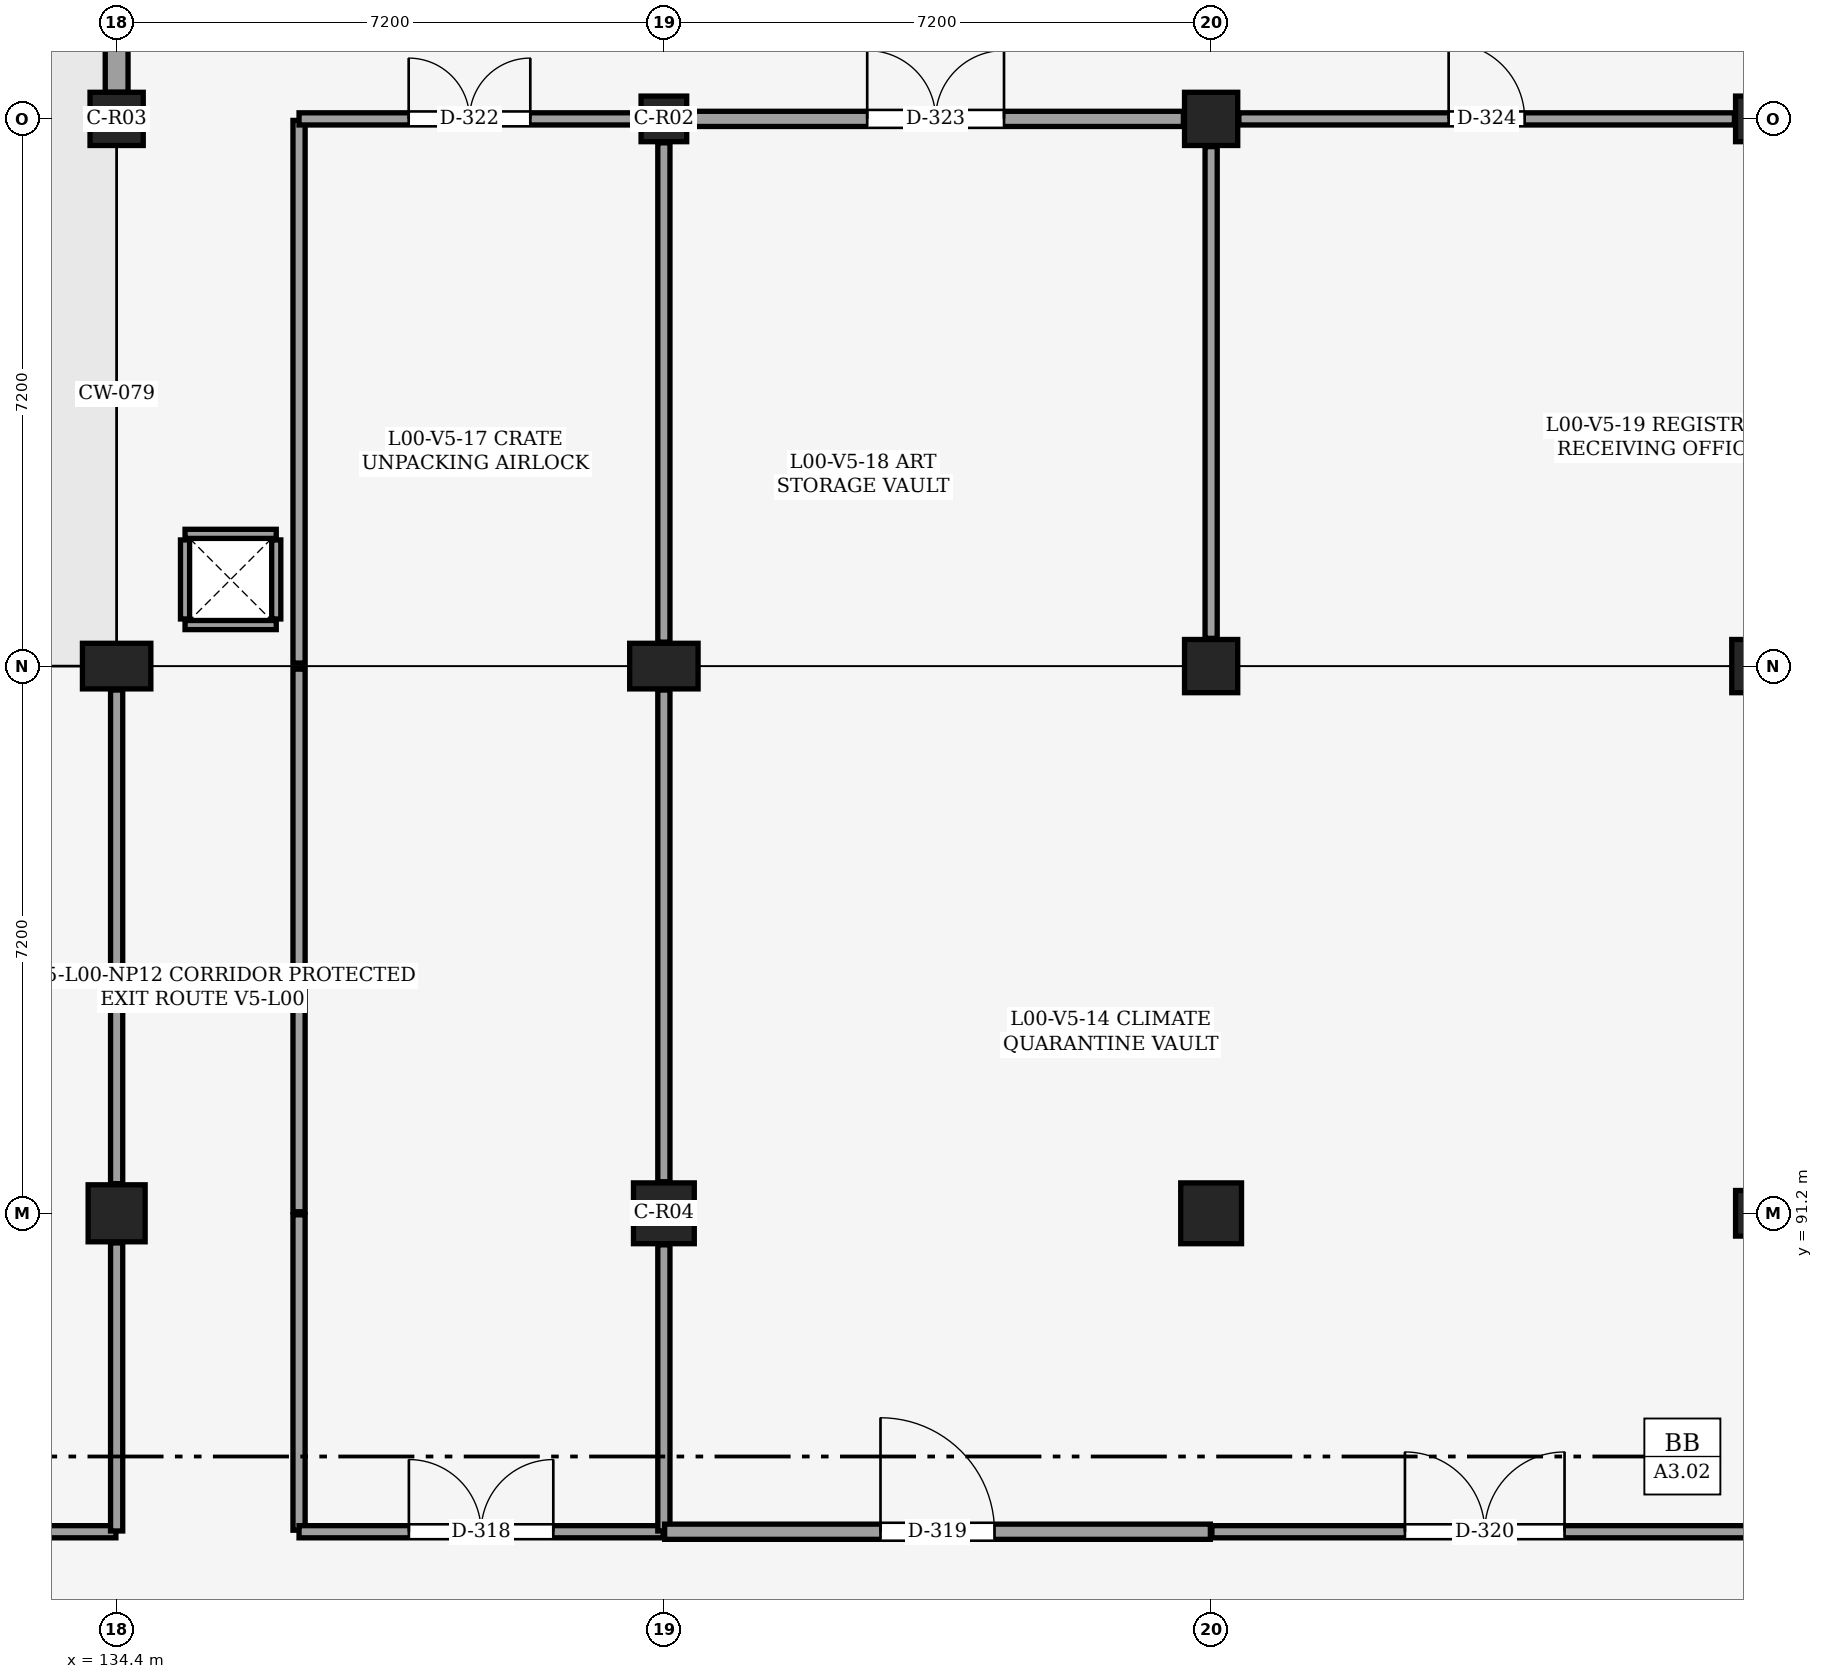
"""IFC4 building model, lengths in metres.
Left out: names, types, materials, properties, quantities, classifications, styles, units other than length and angle.
Written with IfcOpenShell. Run it as: python <this file> out.ifc"""

import sys

from ifc_helpers import new_model, si_unit, direction, frame, frame_2d, origin, origin_2d, place, context, subcontext, project, spatial, rectangle, circle, extrude, element, fill, save


model = new_model("IFC4")
c1 = context("Model", 3, precision=1e-05, world=origin(), true_north=direction((0.0, 1.0)))
c2 = subcontext(c1, "Body", "Model", "MODEL_VIEW")
j1 = project(units=[si_unit("LENGTHUNIT", "METRE"), si_unit("PLANEANGLEUNIT", "RADIAN")], contexts=[c1])
p1 = place(None, origin())
s1 = spatial("IfcSite", under=j1, at=p1, CompositionType="ELEMENT")
p2 = place(p1, origin())
s2 = spatial("IfcBuilding", under=s1, at=p2, CompositionType="ELEMENT")
p3 = place(p2, origin())
s3 = spatial("IfcBuildingStorey", under=s2, at=p3, CompositionType="ELEMENT", Elevation=0.0)
p4 = place(p3, frame((134.4, 91.2, 0.0), z_axis=(0.0, 0.0, 1.0), x_axis=(1.0, 0.0, 0.0)))
e1 = element("IfcColumn", 1, at=p4, inside=s3, PredefinedType="COLUMN", context=c2, shape_type="SweptSolid", body=[
    extrude(circle(Radius=0.375, at=origin_2d()), origin(), (0.0, 0.0, 1.0), 5.4),
])
p5 = place(p3, frame((134.4, 98.4, 0.0), z_axis=(0.0, 0.0, 1.0), x_axis=(1.0, 0.0, 0.0)))
e2 = element("IfcColumn", 2, at=p5, inside=s3, PredefinedType="COLUMN", context=c2, shape_type="SweptSolid", body=[
    extrude(rectangle(XDim=0.9, YDim=0.6, at=origin_2d()), origin(), (0.0, 0.0, 1.0), 5.4),
])
p6 = place(p3, frame((134.4, 105.6, 0.0), z_axis=(0.0, 0.0, 1.0), x_axis=(1.0, 0.0, 0.0)))
e3 = element("IfcColumn", 3, at=p6, inside=s3, PredefinedType="COLUMN", context=c2, shape_type="SweptSolid", body=[
    extrude(rectangle(XDim=0.7, YDim=0.7, at=origin_2d()), origin(), (0.0, 0.0, 1.0), 5.4),
])
p7 = place(p3, frame((141.6, 91.2, 0.0), z_axis=(0.0, 0.0, 1.0), x_axis=(1.0, 0.0, 0.0)))
e4 = element("IfcColumn", 4, at=p7, inside=s3, PredefinedType="COLUMN", context=c2, shape_type="SweptSolid", body=[
    extrude(rectangle(XDim=0.8, YDim=0.8, at=origin_2d()), origin(), (0.0, 0.0, 1.0), 5.4),
])
p8 = place(p3, frame((141.6, 98.4, 0.0), z_axis=(0.0, 0.0, 1.0), x_axis=(1.0, 0.0, 0.0)))
e5 = element("IfcColumn", 5, at=p8, inside=s3, PredefinedType="COLUMN", context=c2, shape_type="SweptSolid", body=[
    extrude(rectangle(XDim=0.9, YDim=0.6, at=origin_2d()), origin(), (0.0, 0.0, 1.0), 5.4),
])
p9 = place(p3, frame((141.6, 105.6, 0.0), z_axis=(0.0, 0.0, 1.0), x_axis=(1.0, 0.0, 0.0)))
e6 = element("IfcColumn", 6, at=p9, inside=s3, PredefinedType="COLUMN", context=c2, shape_type="SweptSolid", body=[
    extrude(rectangle(XDim=0.6, YDim=0.6, at=origin_2d()), origin(), (0.0, 0.0, 1.0), 5.4),
])
p10 = place(p3, frame((148.8, 91.2, 0.0), z_axis=(0.0, 0.0, 1.0), x_axis=(1.0, 0.0, 0.0)))
e7 = element("IfcColumn", 7, at=p10, inside=s3, PredefinedType="COLUMN", context=c2, shape_type="SweptSolid", body=[
    extrude(rectangle(XDim=0.8, YDim=0.8, at=origin_2d()), origin(), (0.0, 0.0, 1.0), 5.4),
])
for number, where, z_axis, x_axis in (
    (8, (148.8, 98.4, 0.0), (0.0, 0.0, 1.0), (1.0, 0.0, 0.0)),
    (9, (148.8, 105.6, 0.0), (0.0, 0.0, 1.0), (1.0, 0.0, 0.0)),
):
    element("IfcColumn", number, at=place(p3, frame(where, z_axis=z_axis, x_axis=x_axis)), inside=s3, PredefinedType="COLUMN", context=c2, shape_type="SweptSolid", body=[
        extrude(rectangle(XDim=0.7, YDim=0.7, at=origin_2d()), origin(), (0.0, 0.0, 1.0), 5.4),
    ])
p11 = place(p3, frame((156.0, 91.2, 0.0), z_axis=(0.0, 0.0, 1.0), x_axis=(1.0, 0.0, 0.0)))
e10 = element("IfcColumn", 10, at=p11, inside=s3, PredefinedType="COLUMN", context=c2, shape_type="SweptSolid", body=[
    extrude(rectangle(XDim=0.6, YDim=0.6, at=origin_2d()), origin(), (0.0, 0.0, 1.0), 5.4),
])
p12 = place(p3, frame((156.0, 98.4, 0.0), z_axis=(0.0, 0.0, 1.0), x_axis=(1.0, 0.0, 0.0)))
e11 = element("IfcColumn", 11, at=p12, inside=s3, PredefinedType="COLUMN", context=c2, shape_type="SweptSolid", body=[
    extrude(rectangle(XDim=0.7, YDim=0.7, at=origin_2d()), origin(), (0.0, 0.0, 1.0), 5.4),
])
p13 = place(p3, frame((156.0, 105.6, 0.0), z_axis=(0.0, 0.0, 1.0), x_axis=(1.0, 0.0, 0.0)))
e12 = element("IfcColumn", 12, at=p13, inside=s3, PredefinedType="COLUMN", context=c2, shape_type="SweptSolid", body=[
    extrude(rectangle(XDim=0.6, YDim=0.6, at=origin_2d()), origin(), (0.0, 0.0, 1.0), 5.4),
])
p14 = place(p3, frame((134.4, 105.95, 0.0), z_axis=(0.0, 0.0, 1.0), x_axis=(0.0, 1.0, 0.0)))
e13 = element("IfcWall", 13, at=p14, inside=s3, PredefinedType="SOLIDWALL", context=c2, shape_type="SweptSolid", body=[
    extrude(rectangle(XDim=6.55, YDim=0.3, at=frame_2d((3.275, 0.0))), origin(), (0.0, 0.0, 1.0), 4.54),
])
p15 = place(p14, frame((0.75, 0.0, 0.9)))
e14 = element("IfcOpeningElement", 14, at=p15, cuts=e13, PredefinedType="OPENING", context=c2, shape_type="SweptSolid", body=[
    extrude(rectangle(XDim=1.2, YDim=1.5, at=frame_2d((0.6, 0.75))), frame((0.0, 0.16, 0.0), z_axis=(0.0, -1.0, 0.0), x_axis=(1.0, 0.0, 0.0)), (0.0, 0.0, 1.0), 0.321),
])
for number, where, z_axis, x_axis in (
    (15, (135.3, 98.94, 0.0), (0.0, 0.0, 1.0), (1.0, 0.0, 0.0)),
    (16, (135.3, 100.14, 0.0), (0.0, 0.0, 1.0), (1.0, 0.0, 0.0)),
):
    element("IfcWall", number, at=place(p3, frame(where, z_axis=z_axis, x_axis=x_axis)), inside=s3, PredefinedType="PARTITIONING", context=c2, shape_type="SweptSolid", body=[
        extrude(rectangle(XDim=1.2, YDim=0.12, at=frame_2d((0.6, 0.0))), origin(), (0.0, 0.0, 1.0), 5.16),
    ])
for number, where, z_axis, x_axis in (
    (17, (135.3, 99.02, 0.0), (0.0, 0.0, 1.0), (0.0, 1.0, 0.0)),
    (18, (136.5, 99.02, 0.0), (0.0, 0.0, 1.0), (0.0, 1.0, 0.0)),
):
    element("IfcWall", number, at=place(p3, frame(where, z_axis=z_axis, x_axis=x_axis)), inside=s3, PredefinedType="PARTITIONING", context=c2, shape_type="SweptSolid", body=[
        extrude(rectangle(XDim=1.04, YDim=0.12, at=frame_2d((0.52, 0.0))), origin(), (0.0, 0.0, 1.0), 5.16),
    ])
p16 = place(p3, frame((127.21, 87.01, 0.0), z_axis=(0.0, 0.0, 1.0), x_axis=(1.0, 0.0, 0.0)))
e19 = element("IfcWall", 19, at=p16, inside=s3, PredefinedType="PARTITIONING", context=c2, shape_type="SweptSolid", body=[
    extrude(rectangle(XDim=7.18, YDim=0.16, at=frame_2d((3.59, 0.0))), origin(), (0.0, 0.0, 1.0), 5.14),
])
p17 = place(p16, frame((2.74, 0.0, 0.0)))
e20 = element("IfcOpeningElement", 20, at=p17, cuts=e19, PredefinedType="OPENING", context=c2, shape_type="SweptSolid", body=[
    extrude(rectangle(XDim=1.7, YDim=2.4, at=frame_2d((0.85, 1.2))), frame((0.0, 0.09, 0.0), z_axis=(0.0, -1.0, 0.0), x_axis=(1.0, 0.0, 0.0)), (0.0, 0.0, 1.0), 0.18),
])
p18 = place(p3, frame((134.4, 87.02, 0.0), z_axis=(0.0, 0.0, 1.0), x_axis=(0.0, 1.0, 0.0)))
e21 = element("IfcWall", 21, at=p18, inside=s3, PredefinedType="PARTITIONING", context=c2, shape_type="SweptSolid", body=[
    extrude(rectangle(XDim=3.79, YDim=0.16, at=frame_2d((1.895, 0.0))), origin(), (0.0, 0.0, 1.0), 4.38),
])
p19 = place(p3, frame((134.4, 91.59, 0.0), z_axis=(0.0, 0.0, 1.0), x_axis=(0.0, 1.0, 0.0)))
e22 = element("IfcWall", 22, at=p19, inside=s3, PredefinedType="PARTITIONING", context=c2, shape_type="SweptSolid", body=[
    extrude(rectangle(XDim=6.495, YDim=0.16, at=frame_2d((3.248, 0.0))), origin(), (0.0, 0.0, 1.0), 4.23),
])
p20 = place(p3, frame((136.8, 87.03, 0.0), z_axis=(0.0, 0.0, 1.0), x_axis=(0.0, 1.0, 0.0)))
e23 = element("IfcWall", 23, at=p20, inside=s3, PredefinedType="PARTITIONING", context=c2, shape_type="SweptSolid", body=[
    extrude(rectangle(XDim=4.15, YDim=0.16, at=frame_2d((2.075, 0.0))), origin(), (0.0, 0.0, 1.0), 5.14),
])
p21 = place(p3, frame((136.8, 91.22, 0.0), z_axis=(0.0, 0.0, 1.0), x_axis=(0.0, 1.0, 0.0)))
e24 = element("IfcWall", 24, at=p21, inside=s3, PredefinedType="PARTITIONING", context=c2, shape_type="SweptSolid", body=[
    extrude(rectangle(XDim=7.14, YDim=0.16, at=frame_2d((3.57, 0.0))), origin(), (0.0, 0.0, 1.0), 5.14),
])
p22 = place(p3, frame((136.8, 87.01, 0.0), z_axis=(0.0, 0.0, 1.0), x_axis=(1.0, 0.0, 0.0)))
e25 = element("IfcWall", 25, at=p22, inside=s3, PredefinedType="PARTITIONING", context=c2, shape_type="SweptSolid", body=[
    extrude(rectangle(XDim=4.79, YDim=0.16, at=frame_2d((2.395, 0.0))), origin(), (0.0, 0.0, 1.0), 5.14),
])
p23 = place(p22, frame((1.445, 0.0, 0.0)))
e26 = element("IfcOpeningElement", 26, at=p23, cuts=e25, PredefinedType="OPENING", context=c2, shape_type="SweptSolid", body=[
    extrude(rectangle(XDim=1.9, YDim=2.45, at=frame_2d((0.95, 1.225))), frame((0.0, 0.09, 0.0), z_axis=(0.0, -1.0, 0.0), x_axis=(1.0, 0.0, 0.0)), (0.0, 0.0, 1.0), 0.18),
])
p24 = place(p3, frame((141.6, 87.02, 0.0), z_axis=(0.0, 0.0, 1.0), x_axis=(0.0, 1.0, 0.0)))
e27 = element("IfcWall", 27, at=p24, inside=s3, PredefinedType="PARTITIONING", context=c2, shape_type="SweptSolid", body=[
    extrude(rectangle(XDim=3.765, YDim=0.16, at=frame_2d((1.882, 0.0))), origin(), (0.0, 0.0, 1.0), 4.23),
])
p25 = place(p3, frame((141.6, 91.615, 0.0), z_axis=(0.0, 0.0, 1.0), x_axis=(0.0, 1.0, 0.0)))
e28 = element("IfcWall", 28, at=p25, inside=s3, PredefinedType="PARTITIONING", context=c2, shape_type="SweptSolid", body=[
    extrude(rectangle(XDim=6.47, YDim=0.16, at=frame_2d((3.235, 0.0))), origin(), (0.0, 0.0, 1.0), 4.48),
])
p26 = place(p3, frame((141.61, 87.01, 0.0), z_axis=(0.0, 0.0, 1.0), x_axis=(1.0, 0.0, 0.0)))
e29 = element("IfcWall", 29, at=p26, inside=s3, PredefinedType="PARTITIONING", context=c2, shape_type="SweptSolid", body=[
    extrude(rectangle(XDim=7.18, YDim=0.2, at=frame_2d((3.59, 0.0))), origin(), (0.0, 0.0, 1.0), 5.14),
])
p27 = place(p26, frame((2.84, 0.0, 0.0)))
e30 = element("IfcOpeningElement", 30, at=p27, cuts=e29, PredefinedType="OPENING", context=c2, shape_type="SweptSolid", body=[
    extrude(rectangle(XDim=1.5, YDim=2.2, at=frame_2d((0.75, 1.1))), frame((0.0, 0.11, 0.0), z_axis=(0.0, -1.0, 0.0), x_axis=(1.0, 0.0, 0.0)), (0.0, 0.0, 1.0), 0.22),
])
p28 = place(p3, frame((148.81, 87.01, 0.0), z_axis=(0.0, 0.0, 1.0), x_axis=(1.0, 0.0, 0.0)))
e31 = element("IfcWall", 31, at=p28, inside=s3, PredefinedType="PARTITIONING", context=c2, shape_type="SweptSolid", body=[
    extrude(rectangle(XDim=7.18, YDim=0.16, at=frame_2d((3.59, 0.0))), origin(), (0.0, 0.0, 1.0), 5.14),
])
p29 = place(p28, frame((2.54, 0.0, 0.0)))
e32 = element("IfcOpeningElement", 32, at=p29, cuts=e31, PredefinedType="OPENING", context=c2, shape_type="SweptSolid", body=[
    extrude(rectangle(XDim=2.1, YDim=2.5, at=frame_2d((1.05, 1.25))), frame((0.0, 0.09, 0.0), z_axis=(0.0, -1.0, 0.0), x_axis=(1.0, 0.0, 0.0)), (0.0, 0.0, 1.0), 0.18),
])
p30 = place(p3, frame((136.8, 98.44, 0.0), z_axis=(0.0, 0.0, 1.0), x_axis=(0.0, 1.0, 0.0)))
e33 = element("IfcWall", 33, at=p30, inside=s3, PredefinedType="PARTITIONING", context=c2, shape_type="SweptSolid", body=[
    extrude(rectangle(XDim=7.14, YDim=0.16, at=frame_2d((3.57, 0.0))), origin(), (0.0, 0.0, 1.0), 5.14),
])
p31 = place(p3, frame((136.8, 105.6, 0.0), z_axis=(0.0, 0.0, 1.0), x_axis=(1.0, 0.0, 0.0)))
e34 = element("IfcWall", 34, at=p31, inside=s3, PredefinedType="PARTITIONING", context=c2, shape_type="SweptSolid", body=[
    extrude(rectangle(XDim=4.485, YDim=0.16, at=frame_2d((2.242, 0.0))), origin(), (0.0, 0.0, 1.0), 4.591),
])
p32 = place(p31, frame((1.442, 0.0, 0.0)))
e35 = element("IfcOpeningElement", 35, at=p32, cuts=e34, PredefinedType="OPENING", context=c2, shape_type="SweptSolid", body=[
    extrude(rectangle(XDim=1.6, YDim=2.35, at=frame_2d((0.8, 1.175))), frame((0.0, 0.09, 0.0), z_axis=(0.0, -1.0, 0.0), x_axis=(1.0, 0.0, 0.0)), (0.0, 0.0, 1.0), 0.18),
])
p33 = place(p3, frame((141.6, 98.715, 0.0), z_axis=(0.0, 0.0, 1.0), x_axis=(0.0, 1.0, 0.0)))
e36 = element("IfcWall", 36, at=p33, inside=s3, PredefinedType="PARTITIONING", context=c2, shape_type="SweptSolid", body=[
    extrude(rectangle(XDim=6.57, YDim=0.16, at=frame_2d((3.285, 0.0))), origin(), (0.0, 0.0, 1.0), 4.48),
])
p34 = place(p3, frame((141.915, 105.6, 0.0), z_axis=(0.0, 0.0, 1.0), x_axis=(1.0, 0.0, 0.0)))
e37 = element("IfcWall", 37, at=p34, inside=s3, PredefinedType="PARTITIONING", context=c2, shape_type="SweptSolid", body=[
    extrude(rectangle(XDim=6.52, YDim=0.2, at=frame_2d((3.26, 0.0))), origin(), (0.0, 0.0, 1.0), 4.607),
])
p35 = place(p34, frame((2.36, 0.0, 0.0)))
e38 = element("IfcOpeningElement", 38, at=p35, cuts=e37, PredefinedType="OPENING", context=c2, shape_type="SweptSolid", body=[
    extrude(rectangle(XDim=1.8, YDim=2.4, at=frame_2d((0.9, 1.2))), frame((0.0, 0.11, 0.0), z_axis=(0.0, -1.0, 0.0), x_axis=(1.0, 0.0, 0.0)), (0.0, 0.0, 1.0), 0.22),
])
p36 = place(p3, frame((148.8, 98.765, 0.0), z_axis=(0.0, 0.0, 1.0), x_axis=(0.0, 1.0, 0.0)))
e39 = element("IfcWall", 39, at=p36, inside=s3, PredefinedType="PARTITIONING", context=c2, shape_type="SweptSolid", body=[
    extrude(rectangle(XDim=6.47, YDim=0.16, at=frame_2d((3.235, 0.0))), origin(), (0.0, 0.0, 1.0), 4.38),
])
p37 = place(p3, frame((149.165, 105.6, 0.0), z_axis=(0.0, 0.0, 1.0), x_axis=(1.0, 0.0, 0.0)))
e40 = element("IfcWall", 40, at=p37, inside=s3, PredefinedType="PARTITIONING", context=c2, shape_type="SweptSolid", body=[
    extrude(rectangle(XDim=6.52, YDim=0.16, at=frame_2d((3.26, 0.0))), origin(), (0.0, 0.0, 1.0), 4.678),
])
p38 = place(p37, frame((2.76, 0.0, 0.0)))
e41 = element("IfcOpeningElement", 41, at=p38, cuts=e40, PredefinedType="OPENING", context=c2, shape_type="SweptSolid", body=[
    extrude(rectangle(XDim=1.0, YDim=2.15, at=frame_2d((0.5, 1.075))), frame((0.0, 0.09, 0.0), z_axis=(0.0, -1.0, 0.0), x_axis=(1.0, 0.0, 0.0)), (0.0, 0.0, 1.0), 0.18),
])
p39 = place(p23, origin())
e42 = element("IfcDoor", 42, at=p39, inside=s3, OperationType="DOUBLE_DOOR_SINGLE_SWING", PredefinedType="DOOR", context=c2, shape_type="SweptSolid", body=[
    extrude(rectangle(XDim=1.9, YDim=2.45, at=frame_2d((0.95, 1.225))), frame((0.0, 0.025, 0.0), z_axis=(0.0, -1.0, 0.0), x_axis=(1.0, 0.0, 0.0)), (0.0, 0.0, 1.0), 0.05),
])
fill(e26, e42)
p40 = place(p27, origin())
e43 = element("IfcDoor", 43, at=p40, inside=s3, OperationType="SINGLE_SWING_LEFT", PredefinedType="DOOR", context=c2, shape_type="SweptSolid", body=[
    extrude(rectangle(XDim=1.5, YDim=2.2, at=frame_2d((0.75, 1.1))), frame((0.0, 0.025, 0.0), z_axis=(0.0, -1.0, 0.0), x_axis=(1.0, 0.0, 0.0)), (0.0, 0.0, 1.0), 0.05),
])
fill(e30, e43)
p41 = place(p29, origin())
e44 = element("IfcDoor", 44, at=p41, inside=s3, OperationType="DOUBLE_DOOR_SINGLE_SWING", PredefinedType="DOOR", context=c2, shape_type="SweptSolid", body=[
    extrude(rectangle(XDim=2.1, YDim=2.5, at=frame_2d((1.05, 1.25))), frame((0.0, 0.025, 0.0), z_axis=(0.0, -1.0, 0.0), x_axis=(1.0, 0.0, 0.0)), (0.0, 0.0, 1.0), 0.05),
])
fill(e32, e44)
p42 = place(p32, origin())
e45 = element("IfcDoor", 45, at=p42, inside=s3, OperationType="DOUBLE_DOOR_SINGLE_SWING", PredefinedType="DOOR", context=c2, shape_type="SweptSolid", body=[
    extrude(rectangle(XDim=1.6, YDim=2.35, at=frame_2d((0.8, 1.175))), frame((0.0, 0.025, 0.0), z_axis=(0.0, -1.0, 0.0), x_axis=(1.0, 0.0, 0.0)), (0.0, 0.0, 1.0), 0.05),
])
fill(e35, e45)
p43 = place(p35, origin())
e46 = element("IfcDoor", 46, at=p43, inside=s3, OperationType="DOUBLE_DOOR_SINGLE_SWING", PredefinedType="DOOR", context=c2, shape_type="SweptSolid", body=[
    extrude(rectangle(XDim=1.8, YDim=2.4, at=frame_2d((0.9, 1.2))), frame((0.0, 0.025, 0.0), z_axis=(0.0, -1.0, 0.0), x_axis=(1.0, 0.0, 0.0)), (0.0, 0.0, 1.0), 0.05),
])
fill(e38, e46)
p44 = place(p38, origin())
e47 = element("IfcDoor", 47, at=p44, inside=s3, OperationType="SINGLE_SWING_LEFT", PredefinedType="DOOR", context=c2, shape_type="SweptSolid", body=[
    extrude(rectangle(XDim=1.0, YDim=2.15, at=frame_2d((0.5, 1.075))), frame((0.0, 0.025, 0.0), z_axis=(0.0, -1.0, 0.0), x_axis=(1.0, 0.0, 0.0)), (0.0, 0.0, 1.0), 0.05),
])
fill(e41, e47)
save(model, sys.argv[1])
